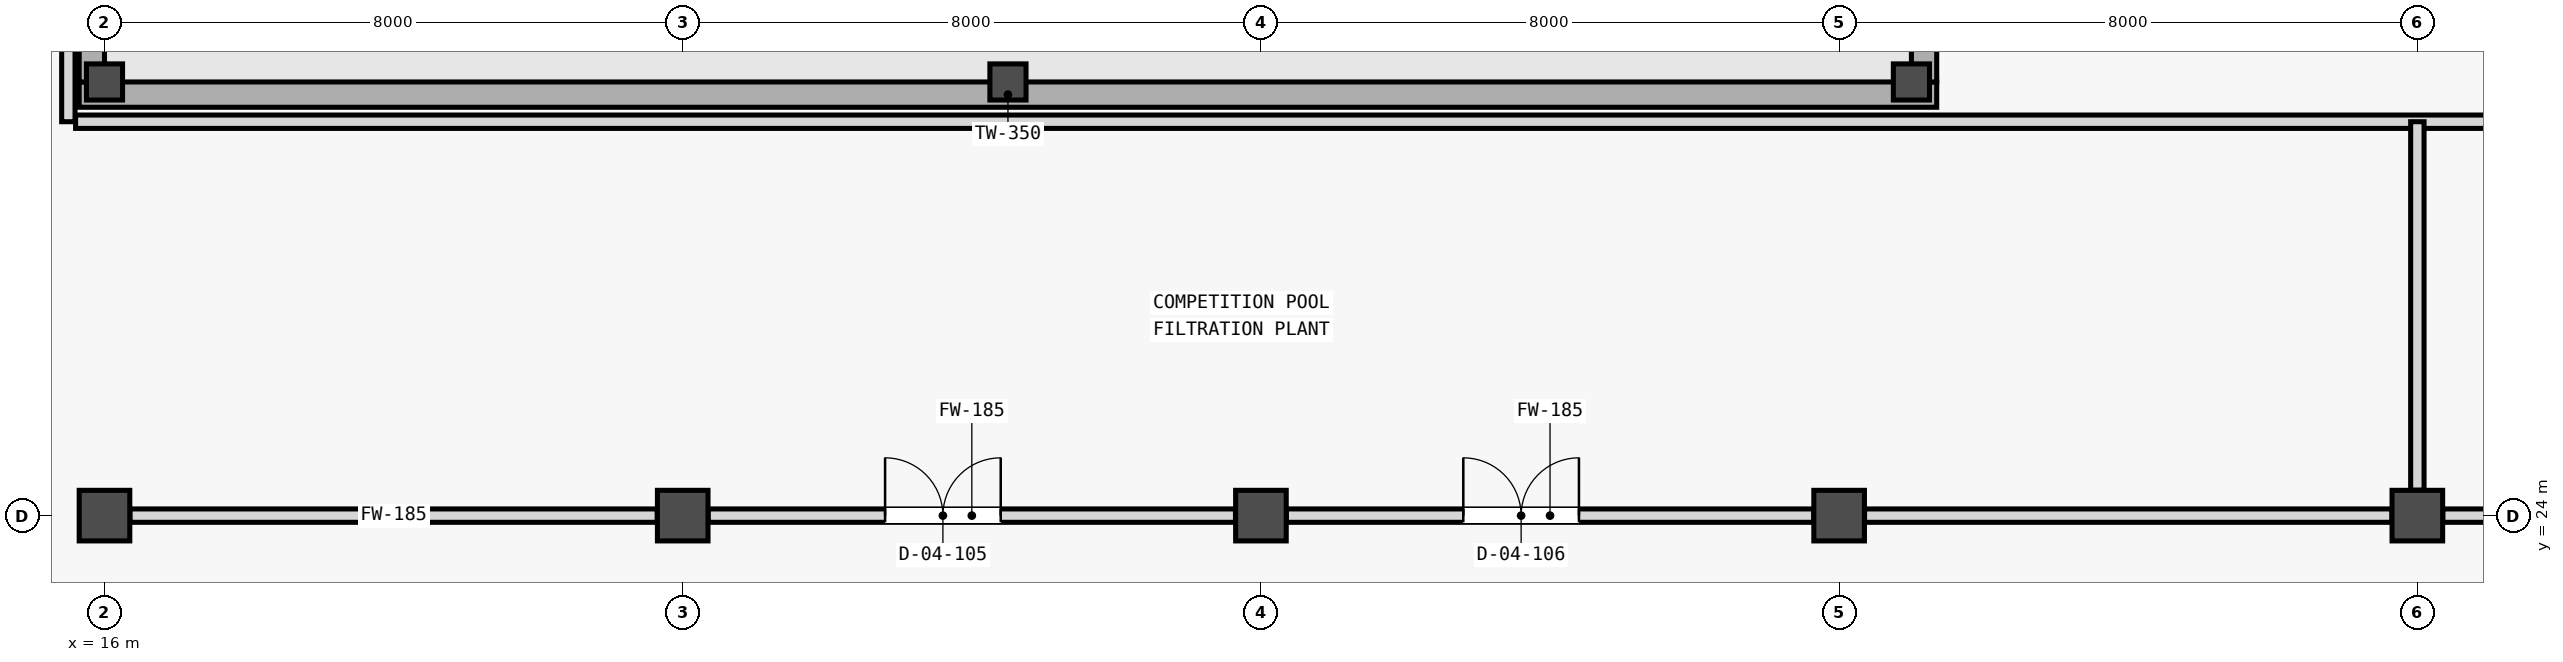
"""IFC4 building model, lengths in metres.
Left out: names, types, materials, properties, quantities, classifications, styles, units other than length and angle.
Written with IfcOpenShell. Run it as: python <this file> out.ifc"""

import sys

from ifc_helpers import new_model, si_unit, direction, frame, frame_2d, origin, origin_2d, place, context, subcontext, project, spatial, rectangle, extrude, element, fill, save


model = new_model("IFC4")
c1 = context("Model", 3, precision=1e-05, world=origin(), true_north=direction((0.0, 1.0)))
c2 = subcontext(c1, "Body", "Model", "MODEL_VIEW")
j1 = project(units=[si_unit("LENGTHUNIT", "METRE"), si_unit("PLANEANGLEUNIT", "RADIAN")], contexts=[c1])
p1 = place(None, origin())
s1 = spatial("IfcSite", under=j1, at=p1, CompositionType="ELEMENT")
p2 = place(p1, origin())
s2 = spatial("IfcBuilding", under=s1, at=p2, CompositionType="ELEMENT")
p3 = place(p2, frame((0.0, 0.0, -4.8)))
s3 = spatial("IfcBuildingStorey", under=s2, at=p3, CompositionType="ELEMENT", Elevation=-4.8)
for number, where, z_axis, x_axis in (
    (1, (16.0, 24.0, 0.0), (0.0, 0.0, 1.0), (1.0, 0.0, 0.0)),
    (2, (24.0, 24.0, 0.0), (0.0, 0.0, 1.0), (1.0, 0.0, 0.0)),
    (3, (32.0, 24.0, 0.0), (0.0, 0.0, 1.0), (1.0, 0.0, 0.0)),
    (4, (40.0, 24.0, 0.0), (0.0, 0.0, 1.0), (1.0, 0.0, 0.0)),
    (5, (48.0, 24.0, 0.0), (0.0, 0.0, 1.0), (1.0, 0.0, 0.0)),
):
    element("IfcColumn", number, at=place(p3, frame(where, z_axis=z_axis, x_axis=x_axis)), inside=s3, PredefinedType="COLUMN", context=c2, shape_type="SweptSolid", body=[
        extrude(rectangle(XDim=0.7, YDim=0.7, at=origin_2d()), origin(), (0.0, 0.0, 1.0), 4.47),
    ])
p4 = place(p3, frame((15.65, 29.825, 3.4), z_axis=(0.0, 0.0, 1.0), x_axis=(1.0, 0.0, 0.0)))
e6 = element("IfcWall", 6, at=p4, inside=s3, PredefinedType="SOLIDWALL", context=c2, shape_type="SweptSolid", body=[
    extrude(rectangle(XDim=25.7, YDim=0.35, at=frame_2d((12.85, 0.0))), origin(), (0.0, 0.0, 1.0), 1.4),
])
for number, where, z_axis, x_axis in (
    (7, (15.825, 30.0, 3.4), (0.0, 0.0, 1.0), (0.0, 1.0, 0.0)),
    (8, (41.175, 30.0, 3.4), (0.0, 0.0, 1.0), (0.0, 1.0, 0.0)),
):
    element("IfcWall", number, at=place(p3, frame(where, z_axis=z_axis, x_axis=x_axis)), inside=s3, PredefinedType="SOLIDWALL", context=c2, shape_type="SweptSolid", body=[
        extrude(rectangle(XDim=16.0, YDim=0.35, at=frame_2d((8.0, 0.0))), origin(), (0.0, 0.0, 1.0), 1.4),
    ])
for number, where, z_axis, x_axis in (
    (9, (16.0, 30.0, 0.0), (0.0, 0.0, 1.0), (1.0, 0.0, 0.0)),
    (10, (28.5, 30.0, 0.0), (0.0, 0.0, 1.0), (1.0, 0.0, 0.0)),
    (11, (41.0, 30.0, 0.0), (0.0, 0.0, 1.0), (1.0, 0.0, 0.0)),
):
    element("IfcColumn", number, at=place(p3, frame(where, z_axis=z_axis, x_axis=x_axis)), inside=s3, PredefinedType="COLUMN", context=c2, shape_type="SweptSolid", body=[
        extrude(rectangle(XDim=0.5, YDim=0.5, at=origin_2d()), origin(), (0.0, 0.0, 1.0), 2.82),
    ])
p5 = place(p3, frame((16.352, 24.0, 0.0), z_axis=(0.0, 0.0, 1.0), x_axis=(1.0, 0.0, 0.0)))
e12 = element("IfcWall", 12, at=p5, inside=s3, PredefinedType="STANDARD", context=c2, shape_type="SweptSolid", body=[
    extrude(rectangle(XDim=7.296, YDim=0.185, at=frame_2d((3.648, 0.0))), origin(), (0.0, 0.0, 1.0), 3.7),
])
p6 = place(p3, frame((24.352, 24.0, 0.0), z_axis=(0.0, 0.0, 1.0), x_axis=(1.0, 0.0, 0.0)))
e13 = element("IfcWall", 13, at=p6, inside=s3, PredefinedType="STANDARD", context=c2, shape_type="SweptSolid", body=[
    extrude(rectangle(XDim=7.296, YDim=0.185, at=frame_2d((3.648, 0.0))), origin(), (0.0, 0.0, 1.0), 3.7),
])
p7 = place(p6, frame((2.448, 0.0, 0.0)))
e14 = element("IfcOpeningElement", 14, at=p7, cuts=e13, PredefinedType="OPENING", context=c2, shape_type="SweptSolid", body=[
    extrude(rectangle(XDim=1.6, YDim=2.3, at=frame_2d((0.8, 1.15))), frame((0.0, 0.103, 0.0), z_axis=(0.0, -1.0, 0.0), x_axis=(1.0, 0.0, 0.0)), (0.0, 0.0, 1.0), 0.205),
])
p8 = place(p3, frame((32.352, 24.0, 0.0), z_axis=(0.0, 0.0, 1.0), x_axis=(1.0, 0.0, 0.0)))
e15 = element("IfcWall", 15, at=p8, inside=s3, PredefinedType="STANDARD", context=c2, shape_type="SweptSolid", body=[
    extrude(rectangle(XDim=7.296, YDim=0.185, at=frame_2d((3.648, 0.0))), origin(), (0.0, 0.0, 1.0), 3.7),
])
p9 = place(p8, frame((2.448, 0.0, 0.0)))
e16 = element("IfcOpeningElement", 16, at=p9, cuts=e15, PredefinedType="OPENING", context=c2, shape_type="SweptSolid", body=[
    extrude(rectangle(XDim=1.6, YDim=2.3, at=frame_2d((0.8, 1.15))), frame((0.0, 0.103, 0.0), z_axis=(0.0, -1.0, 0.0), x_axis=(1.0, 0.0, 0.0)), (0.0, 0.0, 1.0), 0.205),
])
p10 = place(p3, frame((40.352, 24.0, 0.0), z_axis=(0.0, 0.0, 1.0), x_axis=(1.0, 0.0, 0.0)))
e17 = element("IfcWall", 17, at=p10, inside=s3, PredefinedType="STANDARD", context=c2, shape_type="SweptSolid", body=[
    extrude(rectangle(XDim=7.296, YDim=0.185, at=frame_2d((3.648, 0.0))), origin(), (0.0, 0.0, 1.0), 3.7),
])
p11 = place(p3, frame((48.352, 24.0, 0.0), z_axis=(0.0, 0.0, 1.0), x_axis=(1.0, 0.0, 0.0)))
e18 = element("IfcWall", 18, at=p11, inside=s3, PredefinedType="STANDARD", context=c2, shape_type="SweptSolid", body=[
    extrude(rectangle(XDim=7.296, YDim=0.185, at=frame_2d((3.648, 0.0))), origin(), (0.0, 0.0, 1.0), 3.7),
])
p12 = place(p11, frame((2.648, 0.0, 0.0)))
e19 = element("IfcOpeningElement", 19, at=p12, cuts=e18, PredefinedType="OPENING", context=c2, shape_type="SweptSolid", body=[
    extrude(rectangle(XDim=1.75, YDim=2.35, at=frame_2d((0.875, 1.175))), frame((0.0, 0.103, 0.0), z_axis=(0.0, -1.0, 0.0), x_axis=(1.0, 0.0, 0.0)), (0.0, 0.0, 1.0), 0.205),
])
p13 = place(p3, frame((15.6, 29.45, 0.0), z_axis=(0.0, 0.0, 1.0), x_axis=(1.0, 0.0, 0.0)))
e20 = element("IfcWall", 20, at=p13, inside=s3, PredefinedType="STANDARD", context=c2, shape_type="SweptSolid", body=[
    extrude(rectangle(XDim=72.4, YDim=0.185, at=frame_2d((36.2, 0.0))), origin(), (0.0, 0.0, 1.0), 3.75),
])
p14 = place(p3, frame((48.0, 24.352, 0.0), z_axis=(0.0, 0.0, 1.0), x_axis=(0.0, 1.0, 0.0)))
e21 = element("IfcWall", 21, at=p14, inside=s3, PredefinedType="STANDARD", context=c2, shape_type="SweptSolid", body=[
    extrude(rectangle(XDim=5.098, YDim=0.185, at=frame_2d((2.549, 0.0))), origin(), (0.0, 0.0, 1.0), 3.75),
])
p15 = place(p3, frame((15.5, 29.45, 0.0), z_axis=(0.0, 0.0, 1.0), x_axis=(0.0, 1.0, 0.0)))
e22 = element("IfcWall", 22, at=p15, inside=s3, PredefinedType="STANDARD", context=c2, shape_type="SweptSolid", body=[
    extrude(rectangle(XDim=54.123, YDim=0.185, at=frame_2d((27.062, 0.0))), origin(), (0.0, 0.0, 1.0), 4.235),
])
p16 = place(p15, frame((50.35, 0.0, 0.0)))
e23 = element("IfcOpeningElement", 23, at=p16, cuts=e22, PredefinedType="OPENING", context=c2, shape_type="SweptSolid", body=[
    extrude(rectangle(XDim=1.6, YDim=2.3, at=frame_2d((0.8, 1.15))), frame((0.0, 0.103, 0.0), z_axis=(0.0, -1.0, 0.0), x_axis=(1.0, 0.0, 0.0)), (0.0, 0.0, 1.0), 0.205),
])
p17 = place(p7, origin())
e24 = element("IfcDoor", 24, at=p17, inside=s3, OperationType="DOUBLE_DOOR_SINGLE_SWING", PredefinedType="DOOR", context=c2, shape_type="SweptSolid", body=[
    extrude(rectangle(XDim=1.6, YDim=2.3, at=frame_2d((0.8, 1.15))), frame((0.0, 0.025, 0.0), z_axis=(0.0, -1.0, 0.0), x_axis=(1.0, 0.0, 0.0)), (0.0, 0.0, 1.0), 0.05),
])
fill(e14, e24)
p18 = place(p9, origin())
e25 = element("IfcDoor", 25, at=p18, inside=s3, OperationType="DOUBLE_DOOR_SINGLE_SWING", PredefinedType="DOOR", context=c2, shape_type="SweptSolid", body=[
    extrude(rectangle(XDim=1.6, YDim=2.3, at=frame_2d((0.8, 1.15))), frame((0.0, 0.025, 0.0), z_axis=(0.0, -1.0, 0.0), x_axis=(1.0, 0.0, 0.0)), (0.0, 0.0, 1.0), 0.05),
])
fill(e16, e25)
save(model, sys.argv[1])
